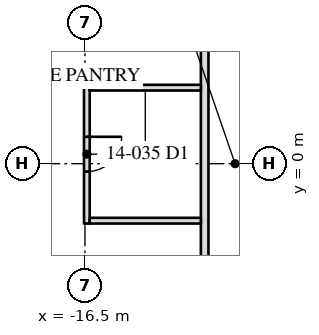
"""IFC4 building model, lengths in metres.
Left out: names, types, materials, properties, quantities, classifications, styles, units other than length and angle.
Written with IfcOpenShell. Run it as: python <this file> out.ifc"""

import sys

from ifc_helpers import new_model, si_unit, direction, frame, frame_2d, origin, place, context, subcontext, project, spatial, rectangle, extrude, element, fill, save


model = new_model("IFC4")
c1 = context("Model", 3, precision=1e-05, world=origin(), true_north=direction((0.0, 1.0)))
c2 = subcontext(c1, "Body", "Model", "MODEL_VIEW")
j1 = project(units=[si_unit("LENGTHUNIT", "METRE"), si_unit("PLANEANGLEUNIT", "RADIAN")], contexts=[c1])
p1 = place(None, origin())
s1 = spatial("IfcSite", under=j1, at=p1, CompositionType="ELEMENT")
p2 = place(p1, origin())
s2 = spatial("IfcBuilding", under=s1, at=p2, CompositionType="ELEMENT")
p3 = place(p2, frame((0.0, 0.0, 61.1)))
s3 = spatial("IfcBuildingStorey", under=s2, at=p3, CompositionType="ELEMENT", Elevation=61.1)
p4 = place(p3, frame((-13.35, 13.45, 0.0), z_axis=(0.0, 0.0, 1.0), x_axis=(0.0, -1.0, 0.0)))
e1 = element("IfcWall", 1, at=p4, inside=s3, PredefinedType="PARTITIONING", context=c2, shape_type="SweptSolid", body=[
    extrude(rectangle(XDim=26.7, YDim=0.2, at=frame_2d((13.35, 0.0))), origin(), (0.0, 0.0, 1.0), 3.91),
])
p5 = place(p4, frame((5.992, 0.0, 0.0)))
e2 = element("IfcOpeningElement", 2, at=p5, cuts=e1, PredefinedType="OPENING", context=c2, shape_type="SweptSolid", body=[
    extrude(rectangle(XDim=0.915, YDim=2.134, at=frame_2d((0.458, 1.067))), frame((0.0, 0.11, 0.0), z_axis=(0.0, -1.0, 0.0), x_axis=(1.0, 0.0, 0.0)), (0.0, 0.0, 1.0), 0.22),
])
p6 = place(p3, frame((-16.45, 2.075, 0.0), z_axis=(0.0, 0.0, 1.0), x_axis=(0.0, -1.0, 0.0)))
e3 = element("IfcWall", 3, at=p6, inside=s3, PredefinedType="PARTITIONING", context=c2, shape_type="SweptSolid", body=[
    extrude(rectangle(XDim=3.65, YDim=0.15, at=frame_2d((1.825, 0.0))), origin(), (0.0, 0.0, 1.0), 3.91),
])
p7 = place(p6, frame((1.367, 0.0, 0.0)))
e4 = element("IfcOpeningElement", 4, at=p7, cuts=e3, PredefinedType="OPENING", context=c2, shape_type="SweptSolid", body=[
    extrude(rectangle(XDim=0.915, YDim=2.134, at=frame_2d((0.458, 1.067))), frame((0.0, 0.085, 0.0), z_axis=(0.0, -1.0, 0.0), x_axis=(1.0, 0.0, 0.0)), (0.0, 0.0, 1.0), 0.17),
])
for number, where, z_axis, x_axis in (
    (5, (-16.375, 2.0, 0.0), (0.0, 0.0, 1.0), (1.0, 0.0, 0.0)),
    (6, (-16.375, -1.5, 0.0), (0.0, 0.0, 1.0), (1.0, 0.0, 0.0)),
):
    element("IfcWall", number, at=place(p3, frame(where, z_axis=z_axis, x_axis=x_axis)), inside=s3, PredefinedType="PARTITIONING", context=c2, shape_type="SweptSolid", body=[
        extrude(rectangle(XDim=2.925, YDim=0.15, at=frame_2d((1.462, 0.0))), origin(), (0.0, 0.0, 1.0), 3.91),
    ])
p8 = place(p7, origin())
e7 = element("IfcDoor", 7, at=p8, inside=s3, OperationType="SINGLE_SWING_LEFT", PredefinedType="DOOR", context=c2, shape_type="SweptSolid", body=[
    extrude(rectangle(XDim=0.915, YDim=2.134, at=frame_2d((0.458, 1.067))), frame((0.0, 0.025, 0.0), z_axis=(0.0, -1.0, 0.0), x_axis=(1.0, 0.0, 0.0)), (0.0, 0.0, 1.0), 0.05),
])
fill(e4, e7)
save(model, sys.argv[1])
